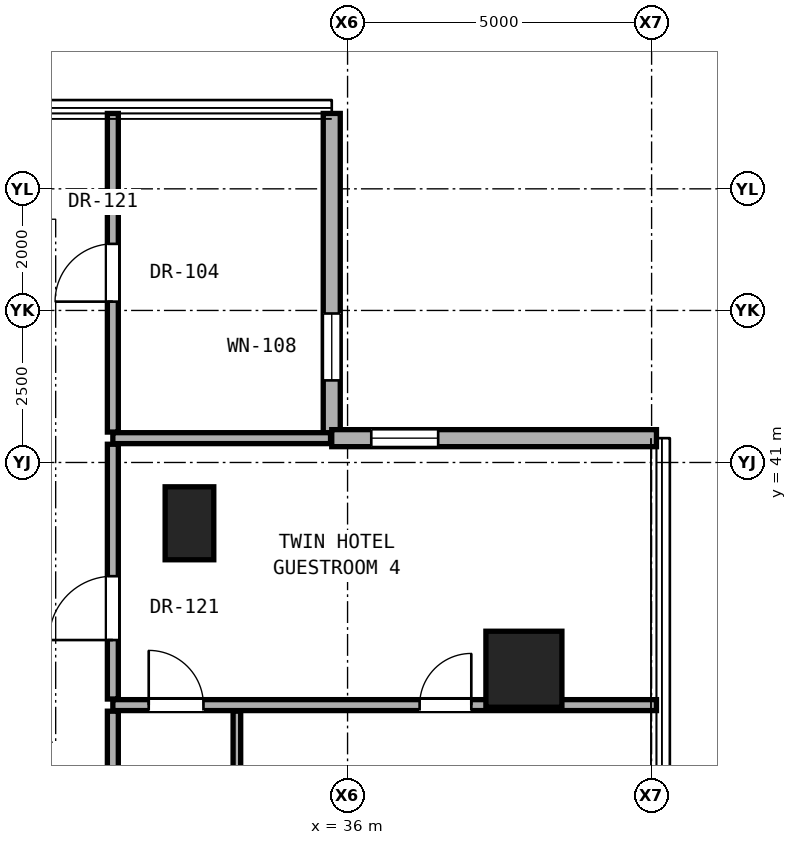
"""IFC4 building model, lengths in metres.
Left out: names, types, materials, properties, quantities, classifications, styles, units other than length and angle.
Written with IfcOpenShell. Run it as: python <this file> out.ifc"""

import sys

from ifc_helpers import new_model, si_unit, direction, frame, frame_2d, origin, origin_2d, place, context, subcontext, project, spatial, rectangle, hollow_rectangle, extrude, element, fill, save


model = new_model("IFC4")
c1 = context("Model", 3, precision=1e-05, world=origin(), true_north=direction((0.0, 1.0)))
c2 = subcontext(c1, "Body", "Model", "MODEL_VIEW")
j1 = project(units=[si_unit("LENGTHUNIT", "METRE"), si_unit("PLANEANGLEUNIT", "RADIAN")], contexts=[c1])
p1 = place(None, origin())
s1 = spatial("IfcSite", under=j1, at=p1, CompositionType="ELEMENT")
p2 = place(p1, origin())
s2 = spatial("IfcBuilding", under=s1, at=p2, CompositionType="ELEMENT")
p3 = place(p2, frame((0.0, 0.0, 52.1)))
s3 = spatial("IfcBuildingStorey", under=s2, at=p3, CompositionType="ELEMENT", Elevation=52.1)
p4 = place(p3, frame((38.9, 37.6, 0.0), z_axis=(0.0, 0.0, 1.0), x_axis=(1.0, 0.0, 0.0)))
e1 = element("IfcColumn", 1, at=p4, inside=s3, PredefinedType="COLUMN", context=c2, shape_type="SweptSolid", body=[
    extrude(hollow_rectangle(XDim=1.25, YDim=1.25, WallThickness=0.07, at=origin_2d()), origin(), (0.0, 0.0, 1.0), 3.3),
])
p5 = place(p3, frame((33.4, 40.0, 0.0), z_axis=(0.0, 0.0, 1.0), x_axis=(1.0, 0.0, 0.0)))
e2 = element("IfcColumn", 2, at=p5, inside=s3, PredefinedType="PILASTER", context=c2, shape_type="SweptSolid", body=[
    extrude(rectangle(XDim=0.8, YDim=1.2, at=origin_2d()), origin(), (0.0, 0.0, 1.0), 3.3),
])
p6 = place(p3, frame((35.74, 41.4, 0.0), z_axis=(0.0, 0.0, 1.0), x_axis=(0.0, 1.0, 0.0)))
e3 = element("IfcWall", 3, at=p6, inside=s3, PredefinedType="SOLIDWALL", context=c2, shape_type="SweptSolid", body=[
    extrude(rectangle(XDim=5.34, YDim=0.28, at=frame_2d((2.67, 0.0))), origin(), (0.0, 0.0, 1.0), 3.04),
])
p7 = place(p6, frame((0.95, 0.0, 0.85)))
e4 = element("IfcOpeningElement", 4, at=p7, cuts=e3, PredefinedType="OPENING", context=c2, shape_type="SweptSolid", body=[
    extrude(rectangle(XDim=1.1, YDim=2.0, at=frame_2d((0.55, 1.0))), frame((0.0, 0.15, 0.0), z_axis=(0.0, -1.0, 0.0), x_axis=(1.0, 0.0, 0.0)), (0.0, 0.0, 1.0), 0.3),
])
p8 = place(p3, frame((41.08, 41.4, 0.0), z_axis=(0.0, 0.0, 1.0), x_axis=(-1.0, 0.0, 0.0)))
e5 = element("IfcWall", 5, at=p8, inside=s3, PredefinedType="SOLIDWALL", context=c2, shape_type="SweptSolid", body=[
    extrude(rectangle(XDim=5.34, YDim=0.28, at=frame_2d((2.67, 0.0))), origin(), (0.0, 0.0, 1.0), 3.04),
])
p9 = place(p8, frame((3.59, 0.0, 0.85)))
e6 = element("IfcOpeningElement", 6, at=p9, cuts=e5, PredefinedType="OPENING", context=c2, shape_type="SweptSolid", body=[
    extrude(rectangle(XDim=1.1, YDim=2.0, at=frame_2d((0.55, 1.0))), frame((0.0, 0.15, 0.0), z_axis=(0.0, -1.0, 0.0), x_axis=(1.0, 0.0, 0.0)), (0.0, 0.0, 1.0), 0.3),
])
p10 = place(p3, frame((32.14, 37.01, 0.0), z_axis=(0.0, 0.0, 1.0), x_axis=(1.0, 0.0, 0.0)))
e7 = element("IfcWall", 7, at=p10, inside=s3, PredefinedType="PARTITIONING", context=c2, shape_type="SweptSolid", body=[
    extrude(rectangle(XDim=8.94, YDim=0.18, at=frame_2d((4.47, 0.0))), origin(), (0.0, 0.0, 1.0), 2.125),
])
p11 = place(p10, frame((5.045, 0.0, 0.0)))
e8 = element("IfcOpeningElement", 8, at=p11, cuts=e7, PredefinedType="OPENING", context=c2, shape_type="SweptSolid", body=[
    extrude(rectangle(XDim=0.85, YDim=2.01, at=frame_2d((0.425, 1.005))), frame((0.0, 0.1, 0.0), z_axis=(0.0, -1.0, 0.0), x_axis=(1.0, 0.0, 0.0)), (0.0, 0.0, 1.0), 0.2),
])
p12 = place(p10, frame((0.59, 0.0, 0.0)))
e9 = element("IfcOpeningElement", 9, at=p12, cuts=e7, PredefinedType="OPENING", context=c2, shape_type="SweptSolid", body=[
    extrude(rectangle(XDim=0.9, YDim=2.1, at=frame_2d((0.45, 1.05))), frame((0.0, 0.1, 0.0), z_axis=(0.0, -1.0, 0.0), x_axis=(1.0, 0.0, 0.0)), (0.0, 0.0, 1.0), 0.2),
])
p13 = place(p3, frame((32.14, 41.4, 0.0), z_axis=(0.0, 0.0, 1.0), x_axis=(1.0, 0.0, 0.0)))
e10 = element("IfcWall", 10, at=p13, inside=s3, PredefinedType="PARTITIONING", context=c2, shape_type="SweptSolid", body=[
    extrude(rectangle(XDim=3.58, YDim=0.18, at=frame_2d((1.79, 0.0))), origin(), (0.0, 0.0, 1.0), 3.06),
])
p14 = place(p3, frame((32.14, 34.363, 0.0), z_axis=(0.0, 0.0, 1.0), x_axis=(0.0, 1.0, 0.0)))
e11 = element("IfcWall", 11, at=p14, inside=s3, PredefinedType="PARTITIONING", context=c2, shape_type="SweptSolid", body=[
    extrude(rectangle(XDim=2.547, YDim=0.18, at=frame_2d((1.274, 0.0))), origin(), (0.0, 0.0, 1.0), 3.06),
])
p15 = place(p3, frame((32.14, 37.11, 0.0), z_axis=(0.0, 0.0, 1.0), x_axis=(0.0, 1.0, 0.0)))
e12 = element("IfcWall", 12, at=p15, inside=s3, PredefinedType="PARTITIONING", context=c2, shape_type="SweptSolid", body=[
    extrude(rectangle(XDim=4.19, YDim=0.18, at=frame_2d((2.095, 0.0))), origin(), (0.0, 0.0, 1.0), 2.436),
])
p16 = place(p15, frame((0.97, 0.0, 0.0)))
e13 = element("IfcOpeningElement", 13, at=p16, cuts=e12, PredefinedType="OPENING", context=c2, shape_type="SweptSolid", body=[
    extrude(rectangle(XDim=1.05, YDim=2.2, at=frame_2d((0.525, 1.1))), frame((0.0, 0.1, 0.0), z_axis=(0.0, -1.0, 0.0), x_axis=(1.0, 0.0, 0.0)), (0.0, 0.0, 1.0), 0.2),
])
p17 = place(p3, frame((32.14, 41.5, 0.0), z_axis=(0.0, 0.0, 1.0), x_axis=(0.0, 1.0, 0.0)))
e14 = element("IfcWall", 14, at=p17, inside=s3, PredefinedType="PARTITIONING", context=c2, shape_type="SweptSolid", body=[
    extrude(rectangle(XDim=5.24, YDim=0.18, at=frame_2d((2.62, 0.0))), origin(), (0.0, 0.0, 1.0), 3.06),
])
p18 = place(p17, frame((2.145, 0.0, 0.0)))
e15 = element("IfcOpeningElement", 15, at=p18, cuts=e14, PredefinedType="OPENING", context=c2, shape_type="SweptSolid", body=[
    extrude(rectangle(XDim=0.95, YDim=2.15, at=frame_2d((0.475, 1.075))), frame((0.0, 0.1, 0.0), z_axis=(0.0, -1.0, 0.0), x_axis=(1.0, 0.0, 0.0)), (0.0, 0.0, 1.0), 0.2),
])
p19 = place(p3, frame((34.18, 34.363, 0.0), z_axis=(0.0, 0.0, 1.0), x_axis=(0.0, 1.0, 0.0)))
e16 = element("IfcWall", 16, at=p19, inside=s3, PredefinedType="PARTITIONING", context=c2, shape_type="SweptSolid", body=[
    extrude(rectangle(XDim=2.547, YDim=0.125, at=frame_2d((1.274, 0.0))), origin(), (0.0, 0.0, 1.0), 3.06),
])
p20 = place(p7, origin())
e17 = element("IfcWindow", 17, at=p20, inside=s3, PartitioningType="SINGLE_PANEL", PredefinedType="WINDOW", context=c2, shape_type="SweptSolid", body=[
    extrude(rectangle(XDim=1.1, YDim=2.0, at=frame_2d((0.55, 1.0))), frame((0.0, 0.03, 0.0), z_axis=(0.0, -1.0, 0.0), x_axis=(1.0, 0.0, 0.0)), (0.0, 0.0, 1.0), 0.06),
])
fill(e4, e17)
p21 = place(p9, origin())
e18 = element("IfcWindow", 18, at=p21, inside=s3, PartitioningType="SINGLE_PANEL", PredefinedType="WINDOW", context=c2, shape_type="SweptSolid", body=[
    extrude(rectangle(XDim=1.1, YDim=2.0, at=frame_2d((0.55, 1.0))), frame((0.0, 0.03, 0.0), z_axis=(0.0, -1.0, 0.0), x_axis=(1.0, 0.0, 0.0)), (0.0, 0.0, 1.0), 0.06),
])
fill(e6, e18)
p22 = place(p16, origin())
e19 = element("IfcDoor", 19, at=p22, inside=s3, OperationType="SINGLE_SWING_LEFT", PredefinedType="DOOR", context=c2, shape_type="SweptSolid", body=[
    extrude(rectangle(XDim=1.05, YDim=2.2, at=frame_2d((0.525, 1.1))), frame((0.0, 0.025, 0.0), z_axis=(0.0, -1.0, 0.0), x_axis=(1.0, 0.0, 0.0)), (0.0, 0.0, 1.0), 0.05),
])
fill(e13, e19)
p23 = place(p11, origin())
e20 = element("IfcDoor", 20, at=p23, inside=s3, OperationType="SINGLE_SWING_RIGHT", PredefinedType="DOOR", context=c2, shape_type="SweptSolid", body=[
    extrude(rectangle(XDim=0.85, YDim=2.01, at=frame_2d((0.425, 1.005))), frame((0.0, 0.025, 0.0), z_axis=(0.0, -1.0, 0.0), x_axis=(1.0, 0.0, 0.0)), (0.0, 0.0, 1.0), 0.05),
])
fill(e8, e20)
p24 = place(p12, origin())
e21 = element("IfcDoor", 21, at=p24, inside=s3, OperationType="SINGLE_SWING_LEFT", PredefinedType="DOOR", context=c2, shape_type="SweptSolid", body=[
    extrude(rectangle(XDim=0.9, YDim=2.1, at=frame_2d((0.45, 1.05))), frame((0.0, 0.025, 0.0), z_axis=(0.0, -1.0, 0.0), x_axis=(1.0, 0.0, 0.0)), (0.0, 0.0, 1.0), 0.05),
])
fill(e9, e21)
p25 = place(p18, origin())
e22 = element("IfcDoor", 22, at=p25, inside=s3, OperationType="SINGLE_SWING_LEFT", PredefinedType="DOOR", context=c2, shape_type="SweptSolid", body=[
    extrude(rectangle(XDim=0.95, YDim=2.15, at=frame_2d((0.475, 1.075))), frame((0.0, 0.025, 0.0), z_axis=(0.0, -1.0, 0.0), x_axis=(1.0, 0.0, 0.0)), (0.0, 0.0, 1.0), 0.05),
])
fill(e15, e22)
save(model, sys.argv[1])
